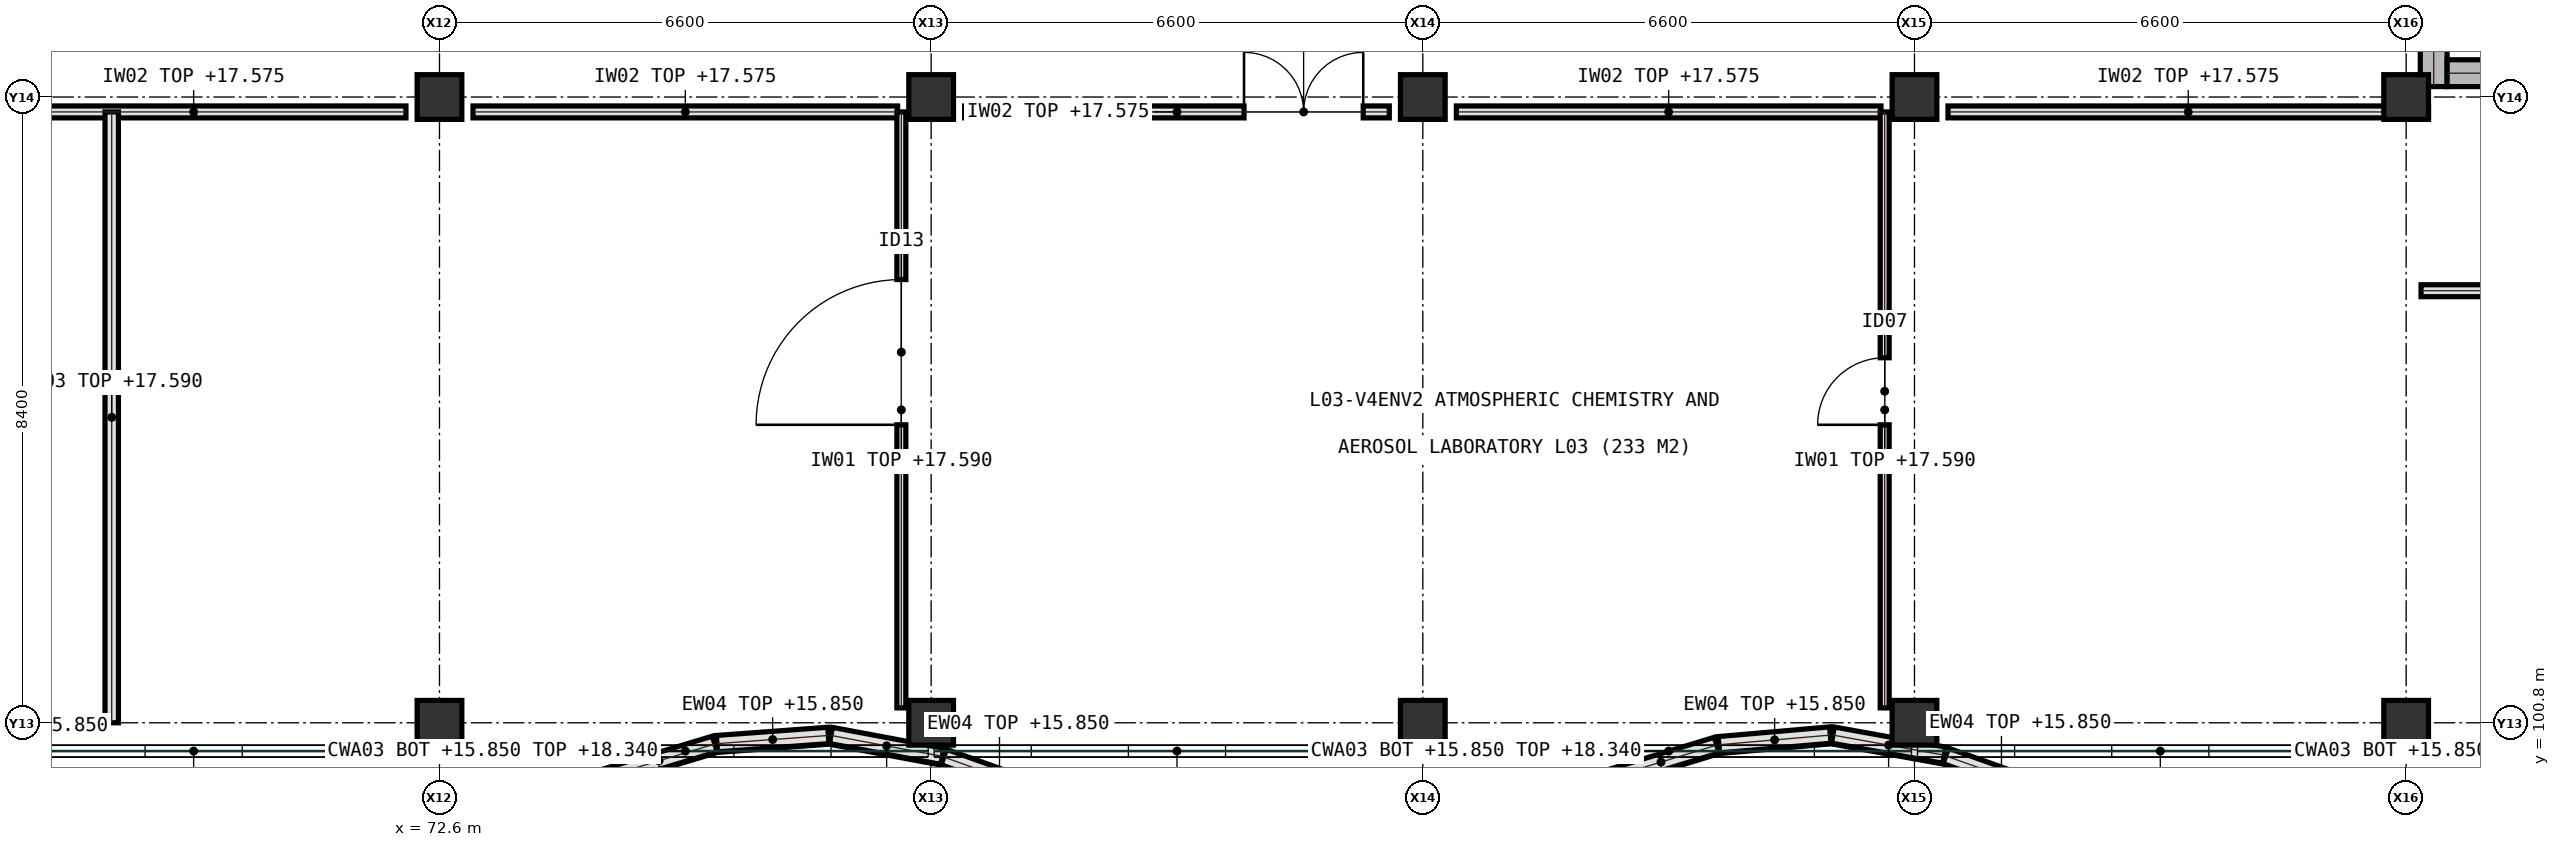
"""IFC4 building model, lengths in metres.
Left out: names, types, materials, properties, quantities, classifications, styles, units other than length and angle.
Written with IfcOpenShell. Run it as: python <this file> out.ifc"""

import sys

from ifc_helpers import new_model, si_unit, direction, frame, frame_2d, origin, origin_2d, place, context, subcontext, project, spatial, rectangle, extrude, element, fill, save


model = new_model("IFC4")
c1 = context("Model", 3, precision=1e-05, world=origin(), true_north=direction((0.0, 1.0)))
c2 = subcontext(c1, "Body", "Model", "MODEL_VIEW")
j1 = project(units=[si_unit("LENGTHUNIT", "METRE"), si_unit("PLANEANGLEUNIT", "RADIAN")], contexts=[c1])
p1 = place(None, origin())
s1 = spatial("IfcSite", under=j1, at=p1, CompositionType="ELEMENT")
p2 = place(p1, origin())
s2 = spatial("IfcBuilding", under=s1, at=p2, CompositionType="ELEMENT")
p3 = place(p2, frame((0.0, 0.0, 14.4)))
s3 = spatial("IfcBuildingStorey", under=s2, at=p3, CompositionType="ELEMENT", Elevation=14.4)
for number, where, z_axis, x_axis in (
    (1, (72.6, 100.8, 0.0), (0.0, 0.0, 1.0), (1.0, 0.0, 0.0)),
    (2, (72.6, 109.2, 0.0), (0.0, 0.0, 1.0), (1.0, 0.0, 0.0)),
    (3, (79.2, 100.8, 0.0), (0.0, 0.0, 1.0), (1.0, 0.0, 0.0)),
    (4, (79.2, 109.2, 0.0), (0.0, 0.0, 1.0), (1.0, 0.0, 0.0)),
    (5, (85.8, 100.8, 0.0), (0.0, 0.0, 1.0), (1.0, 0.0, 0.0)),
    (6, (85.8, 109.2, 0.0), (0.0, 0.0, 1.0), (1.0, 0.0, 0.0)),
    (7, (92.4, 100.8, 0.0), (0.0, 0.0, 1.0), (1.0, 0.0, 0.0)),
    (8, (92.4, 109.2, 0.0), (0.0, 0.0, 1.0), (1.0, 0.0, 0.0)),
    (9, (99.0, 100.8, 0.0), (0.0, 0.0, 1.0), (1.0, 0.0, 0.0)),
    (10, (99.0, 109.2, 0.0), (0.0, 0.0, 1.0), (1.0, 0.0, 0.0)),
):
    element("IfcColumn", number, at=place(p3, frame(where, z_axis=z_axis, x_axis=x_axis)), inside=s3, PredefinedType="COLUMN", context=c2, shape_type="SweptSolid", body=[
        extrude(rectangle(XDim=0.6, YDim=0.6, at=origin_2d()), origin(), (0.0, 0.0, 1.0), 4.2),
    ])
for number, where, z_axis, x_axis in (
    (11, (66.45, 109.0, 0.0), (0.0, 0.0, 1.0), (1.0, 0.0, 0.0)),
    (12, (73.05, 109.0, 0.0), (0.0, 0.0, 1.0), (1.0, 0.0, 0.0)),
):
    element("IfcWall", number, at=place(p3, frame(where, z_axis=z_axis, x_axis=x_axis)), inside=s3, PredefinedType="PARTITIONING", context=c2, shape_type="SweptSolid", body=[
        extrude(rectangle(XDim=5.7, YDim=0.16, at=frame_2d((2.85, 0.0))), origin(), (0.0, 0.0, 1.0), 3.175),
    ])
p4 = place(p3, frame((79.65, 109.0, 0.0), z_axis=(0.0, 0.0, 1.0), x_axis=(1.0, 0.0, 0.0)))
e13 = element("IfcWall", 13, at=p4, inside=s3, PredefinedType="PARTITIONING", context=c2, shape_type="SweptSolid", body=[
    extrude(rectangle(XDim=5.7, YDim=0.16, at=frame_2d((2.85, 0.0))), origin(), (0.0, 0.0, 1.0), 3.175),
])
p5 = place(p4, frame((3.75, 0.0, 0.0)))
e14 = element("IfcOpeningElement", 14, at=p5, cuts=e13, PredefinedType="OPENING", context=c2, shape_type="SweptSolid", body=[
    extrude(rectangle(XDim=1.6, YDim=2.2, at=frame_2d((0.8, 1.1))), frame((0.0, 0.09, 0.0), z_axis=(0.0, -1.0, 0.0), x_axis=(1.0, 0.0, 0.0)), (0.0, 0.0, 1.0), 0.18),
])
p6 = place(p3, frame((86.25, 109.0, 0.0), z_axis=(0.0, 0.0, 1.0), x_axis=(1.0, 0.0, 0.0)))
e15 = element("IfcWall", 15, at=p6, inside=s3, PredefinedType="PARTITIONING", context=c2, shape_type="SweptSolid", body=[
    extrude(rectangle(XDim=5.7, YDim=0.16, at=frame_2d((2.85, 0.0))), origin(), (0.0, 0.0, 1.0), 3.175),
])
p7 = place(p3, frame((92.85, 109.0, 0.0), z_axis=(0.0, 0.0, 1.0), x_axis=(1.0, 0.0, 0.0)))
e16 = element("IfcWall", 16, at=p7, inside=s3, PredefinedType="PARTITIONING", context=c2, shape_type="SweptSolid", body=[
    extrude(rectangle(XDim=6.45, YDim=0.16, at=frame_2d((3.225, 0.0))), origin(), (0.0, 0.0, 1.0), 3.175),
])
p8 = place(p3, frame((68.2, 100.8, 0.0), z_axis=(0.0, 0.0, 1.0), x_axis=(0.0, 1.0, 0.0)))
e17 = element("IfcWall", 17, at=p8, inside=s3, PredefinedType="SOLIDWALL", context=c2, shape_type="SweptSolid", body=[
    extrude(rectangle(XDim=8.2, YDim=0.18, at=frame_2d((4.1, 0.0))), origin(), (0.0, 0.0, 1.0), 3.19),
])
p9 = place(p3, frame((78.8, 101.0, 0.0), z_axis=(0.0, 0.0, 1.0), x_axis=(0.0, 1.0, 0.0)))
e18 = element("IfcWall", 18, at=p9, inside=s3, PredefinedType="PARTITIONING", context=c2, shape_type="SweptSolid", body=[
    extrude(rectangle(XDim=8.0, YDim=0.12, at=frame_2d((4.0, 0.0))), origin(), (0.0, 0.0, 1.0), 3.19),
])
p10 = place(p9, frame((3.8, 0.0, 0.0)))
e19 = element("IfcOpeningElement", 19, at=p10, cuts=e18, PredefinedType="OPENING", context=c2, shape_type="SweptSolid", body=[
    extrude(rectangle(XDim=1.95, YDim=2.35, at=frame_2d((0.975, 1.175))), frame((0.0, 0.07, 0.0), z_axis=(0.0, -1.0, 0.0), x_axis=(1.0, 0.0, 0.0)), (0.0, 0.0, 1.0), 0.14),
])
p11 = place(p3, frame((92.0, 101.0, 0.0), z_axis=(0.0, 0.0, 1.0), x_axis=(0.0, 1.0, 0.0)))
e20 = element("IfcWall", 20, at=p11, inside=s3, PredefinedType="PARTITIONING", context=c2, shape_type="SweptSolid", body=[
    extrude(rectangle(XDim=8.0, YDim=0.12, at=frame_2d((4.0, 0.0))), origin(), (0.0, 0.0, 1.0), 3.19),
])
p12 = place(p11, frame((3.8, 0.0, 0.0)))
e21 = element("IfcOpeningElement", 21, at=p12, cuts=e20, PredefinedType="OPENING", context=c2, shape_type="SweptSolid", body=[
    extrude(rectangle(XDim=0.9, YDim=2.1, at=frame_2d((0.45, 1.05))), frame((0.0, 0.07, 0.0), z_axis=(0.0, -1.0, 0.0), x_axis=(1.0, 0.0, 0.0)), (0.0, 0.0, 1.0), 0.14),
])
p13 = place(p3, frame((99.2, 106.6, 0.0), z_axis=(0.0, 0.0, 1.0), x_axis=(1.0, 0.0, 0.0)))
e22 = element("IfcWall", 22, at=p13, inside=s3, PredefinedType="PARTITIONING", context=c2, shape_type="SweptSolid", body=[
    extrude(rectangle(XDim=12.9, YDim=0.16, at=frame_2d((6.45, 0.0))), origin(), (0.0, 0.0, 1.0), 3.19),
])
p14 = place(p13, frame((4.2, 0.0, 0.0)))
e23 = element("IfcOpeningElement", 23, at=p14, cuts=e22, PredefinedType="OPENING", context=c2, shape_type="SweptSolid", body=[
    extrude(rectangle(XDim=1.05, YDim=2.15, at=frame_2d((0.525, 1.075))), frame((0.0, 0.09, 0.0), z_axis=(0.0, -1.0, 0.0), x_axis=(1.0, 0.0, 0.0)), (0.0, 0.0, 1.0), 0.18),
])
p15 = place(p3, frame((65.925, 100.325, 0.0), z_axis=(0.0, 0.0, 1.0), x_axis=(0.940508911561, -0.339769020476, 0.0)))
e24 = element("IfcWall", 24, at=p15, inside=s3, PredefinedType="SOLIDWALL", context=c2, shape_type="SweptSolid", body=[
    extrude(rectangle(XDim=1.589, YDim=0.22, at=frame_2d((0.795, 0.0))), origin(), (0.0, 0.0, 1.0), 1.45),
])
p16 = place(p3, frame((74.8, 100.065, 0.0), z_axis=(0.0, 0.0, 1.0), x_axis=(0.957563325811, 0.288222964147, 0.0)))
e25 = element("IfcWall", 25, at=p16, inside=s3, PredefinedType="SOLIDWALL", context=c2, shape_type="SweptSolid", body=[
    extrude(rectangle(XDim=1.561, YDim=0.22, at=frame_2d((0.781, 0.0))), origin(), (0.0, 0.0, 1.0), 1.45),
])
p17 = place(p3, frame((76.325, 100.52, 0.0), z_axis=(0.0, 0.0, 1.0), x_axis=(0.997311127119, 0.073283802613, 0.0)))
e26 = element("IfcWall", 26, at=p17, inside=s3, PredefinedType="SOLIDWALL", context=c2, shape_type="SweptSolid", body=[
    extrude(rectangle(XDim=1.499, YDim=0.22, at=frame_2d((0.75, 0.0))), origin(), (0.0, 0.0, 1.0), 1.45),
])
p18 = place(p3, frame((77.855, 100.63, 0.0), z_axis=(0.0, 0.0, 1.0), x_axis=(0.982937538703, -0.18393965045, 0.0)))
e27 = element("IfcWall", 27, at=p18, inside=s3, PredefinedType="SOLIDWALL", context=c2, shape_type="SweptSolid", body=[
    extrude(rectangle(XDim=1.521, YDim=0.22, at=frame_2d((0.76, 0.0))), origin(), (0.0, 0.0, 1.0), 1.45),
])
p19 = place(p3, frame((79.37, 100.34, 0.0), z_axis=(0.0, 0.0, 1.0), x_axis=(0.941487691535, -0.337047365645, 0.0)))
e28 = element("IfcWall", 28, at=p19, inside=s3, PredefinedType="SOLIDWALL", context=c2, shape_type="SweptSolid", body=[
    extrude(rectangle(XDim=1.588, YDim=0.22, at=frame_2d((0.794, 0.0))), origin(), (0.0, 0.0, 1.0), 1.45),
])
p20 = place(p3, frame((88.25, 100.045, 0.0), z_axis=(0.0, 0.0, 1.0), x_axis=(0.956666312552, 0.291186480503, 0.0)))
e29 = element("IfcWall", 29, at=p20, inside=s3, PredefinedType="SOLIDWALL", context=c2, shape_type="SweptSolid", body=[
    extrude(rectangle(XDim=1.563, YDim=0.22, at=frame_2d((0.781, 0.0))), origin(), (0.0, 0.0, 1.0), 1.45),
])
p21 = place(p3, frame((89.775, 100.505, 0.0), z_axis=(0.0, 0.0, 1.0), x_axis=(0.996233870581, 0.086706834262, 0.0)))
e30 = element("IfcWall", 30, at=p21, inside=s3, PredefinedType="SOLIDWALL", context=c2, shape_type="SweptSolid", body=[
    extrude(rectangle(XDim=1.501, YDim=0.22, at=frame_2d((0.75, 0.0))), origin(), (0.0, 0.0, 1.0), 1.45),
])
p22 = place(p3, frame((91.305, 100.635, 0.0), z_axis=(0.0, 0.0, 1.0), x_axis=(0.984080055178, -0.177725757842, 0.0)))
e31 = element("IfcWall", 31, at=p22, inside=s3, PredefinedType="SOLIDWALL", context=c2, shape_type="SweptSolid", body=[
    extrude(rectangle(XDim=1.519, YDim=0.22, at=frame_2d((0.76, 0.0))), origin(), (0.0, 0.0, 1.0), 1.45),
])
p23 = place(p3, frame((92.82, 100.355, 0.0), z_axis=(0.0, 0.0, 1.0), x_axis=(0.942509092402, -0.334180506223, 0.0)))
e32 = element("IfcWall", 32, at=p23, inside=s3, PredefinedType="SOLIDWALL", context=c2, shape_type="SweptSolid", body=[
    extrude(rectangle(XDim=1.586, YDim=0.22, at=frame_2d((0.793, 0.0))), origin(), (0.0, 0.0, 1.0), 1.45),
])
p24 = place(p3, frame((99.37, 109.34, 0.0), z_axis=(0.0, 0.0, 1.0), x_axis=(0.0, 1.0, 0.0)))
e33 = element("IfcWall", 33, at=p24, inside=s3, PredefinedType="SHEAR", context=c2, shape_type="SweptSolid", body=[
    extrude(rectangle(XDim=8.09, YDim=0.36, at=frame_2d((4.045, 0.0))), origin(), (0.0, 0.0, 1.0), 3.94),
])
p25 = place(p3, frame((99.55, 109.52, 0.0), z_axis=(0.0, 0.0, 1.0), x_axis=(1.0, 0.0, 0.0)))
e34 = element("IfcWall", 34, at=p25, inside=s3, PredefinedType="SHEAR", context=c2, shape_type="SweptSolid", body=[
    extrude(rectangle(XDim=3.8, YDim=0.36, at=frame_2d((1.9, 0.0))), origin(), (0.0, 0.0, 1.0), 3.94),
])
p26 = place(p5, origin())
e35 = element("IfcDoor", 35, at=p26, inside=s3, OperationType="DOUBLE_DOOR_SINGLE_SWING", PredefinedType="DOOR", context=c2, shape_type="SweptSolid", body=[
    extrude(rectangle(XDim=1.6, YDim=2.2, at=frame_2d((0.8, 1.1))), frame((0.0, 0.025, 0.0), z_axis=(0.0, -1.0, 0.0), x_axis=(1.0, 0.0, 0.0)), (0.0, 0.0, 1.0), 0.05),
])
fill(e14, e35)
p27 = place(p10, origin())
e36 = element("IfcDoor", 36, at=p27, inside=s3, OperationType="SINGLE_SWING_LEFT", PredefinedType="DOOR", context=c2, shape_type="SweptSolid", body=[
    extrude(rectangle(XDim=1.95, YDim=2.35, at=frame_2d((0.975, 1.175))), frame((0.0, 0.025, 0.0), z_axis=(0.0, -1.0, 0.0), x_axis=(1.0, 0.0, 0.0)), (0.0, 0.0, 1.0), 0.05),
])
fill(e19, e36)
p28 = place(p12, origin())
e37 = element("IfcDoor", 37, at=p28, inside=s3, OperationType="SINGLE_SWING_LEFT", PredefinedType="DOOR", context=c2, shape_type="SweptSolid", body=[
    extrude(rectangle(XDim=0.9, YDim=2.1, at=frame_2d((0.45, 1.05))), frame((0.0, 0.025, 0.0), z_axis=(0.0, -1.0, 0.0), x_axis=(1.0, 0.0, 0.0)), (0.0, 0.0, 1.0), 0.05),
])
fill(e21, e37)
save(model, sys.argv[1])
